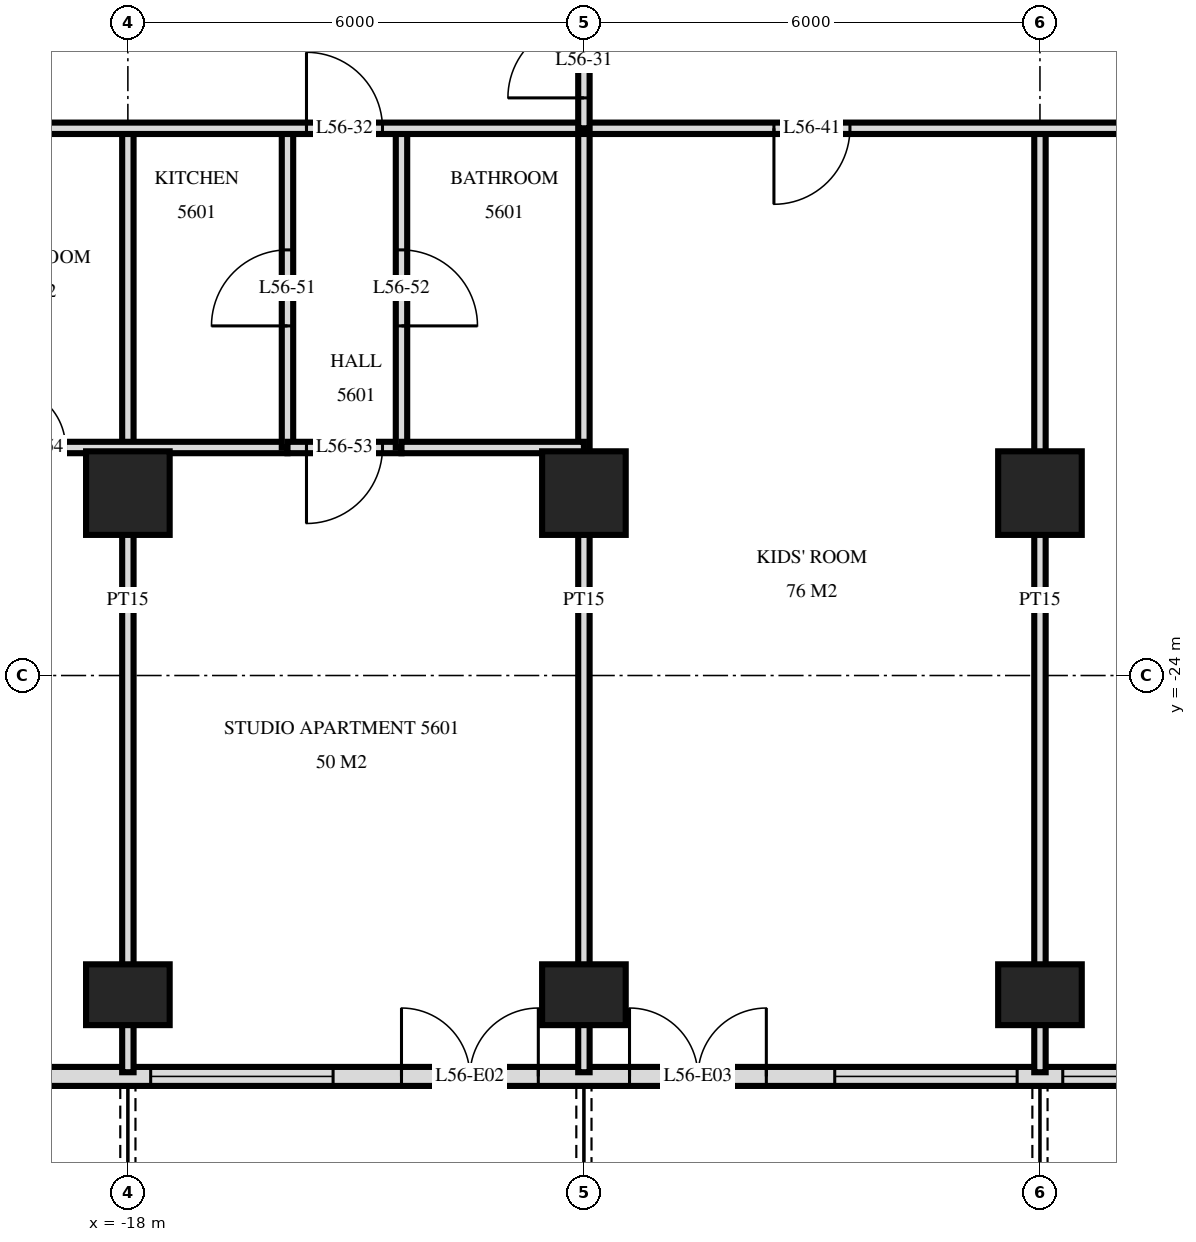
"""IFC4 building model, lengths in metres.
Left out: names, types, materials, properties, quantities, classifications, styles, units other than length and angle.
Written with IfcOpenShell. Run it as: python <this file> out.ifc"""

import sys

from ifc_helpers import new_model, si_unit, direction, frame, frame_2d, origin, origin_2d, place, context, subcontext, project, spatial, rectangle, extrude, element, fill, save


model = new_model("IFC4")
c1 = context("Model", 3, precision=1e-05, world=origin(), true_north=direction((0.0, 1.0)))
c2 = subcontext(c1, "Body", "Model", "MODEL_VIEW")
j1 = project(units=[si_unit("LENGTHUNIT", "METRE"), si_unit("PLANEANGLEUNIT", "RADIAN")], contexts=[c1])
p1 = place(None, origin())
s1 = spatial("IfcSite", under=j1, at=p1, CompositionType="ELEMENT")
p2 = place(p1, origin())
s2 = spatial("IfcBuilding", under=s1, at=p2, CompositionType="ELEMENT")
p3 = place(p2, frame((0.0, 0.0, 215.1)))
s3 = spatial("IfcBuildingStorey", under=s2, at=p3, CompositionType="ELEMENT", Elevation=215.1)
p4 = place(p3, frame((-18.0, -28.2, 0.0), z_axis=(0.0, 0.0, 1.0), x_axis=(1.0, 0.0, 0.0)))
e1 = element("IfcColumn", 1, at=p4, inside=s3, PredefinedType="COLUMN", context=c2, shape_type="SweptSolid", body=[
    extrude(rectangle(XDim=1.1, YDim=0.8, at=origin_2d()), origin(), (0.0, 0.0, 1.0), 3.5),
])
p5 = place(p3, frame((-18.0, -21.6, 0.0), z_axis=(0.0, 0.0, 1.0), x_axis=(1.0, 0.0, 0.0)))
e2 = element("IfcColumn", 2, at=p5, inside=s3, PredefinedType="COLUMN", context=c2, shape_type="SweptSolid", body=[
    extrude(rectangle(XDim=1.1, YDim=1.1, at=origin_2d()), origin(), (0.0, 0.0, 1.0), 3.5),
])
p6 = place(p3, frame((-12.0, -28.2, 0.0), z_axis=(0.0, 0.0, 1.0), x_axis=(1.0, 0.0, 0.0)))
e3 = element("IfcColumn", 3, at=p6, inside=s3, PredefinedType="COLUMN", context=c2, shape_type="SweptSolid", body=[
    extrude(rectangle(XDim=1.1, YDim=0.8, at=origin_2d()), origin(), (0.0, 0.0, 1.0), 3.5),
])
p7 = place(p3, frame((-12.0, -21.6, 0.0), z_axis=(0.0, 0.0, 1.0), x_axis=(1.0, 0.0, 0.0)))
e4 = element("IfcColumn", 4, at=p7, inside=s3, PredefinedType="COLUMN", context=c2, shape_type="SweptSolid", body=[
    extrude(rectangle(XDim=1.1, YDim=1.1, at=origin_2d()), origin(), (0.0, 0.0, 1.0), 3.5),
])
p8 = place(p3, frame((-6.0, -28.2, 0.0), z_axis=(0.0, 0.0, 1.0), x_axis=(1.0, 0.0, 0.0)))
e5 = element("IfcColumn", 5, at=p8, inside=s3, PredefinedType="COLUMN", context=c2, shape_type="SweptSolid", body=[
    extrude(rectangle(XDim=1.1, YDim=0.8, at=origin_2d()), origin(), (0.0, 0.0, 1.0), 3.5),
])
p9 = place(p3, frame((-6.0, -21.6, 0.0), z_axis=(0.0, 0.0, 1.0), x_axis=(1.0, 0.0, 0.0)))
e6 = element("IfcColumn", 6, at=p9, inside=s3, PredefinedType="COLUMN", context=c2, shape_type="SweptSolid", body=[
    extrude(rectangle(XDim=1.1, YDim=1.1, at=origin_2d()), origin(), (0.0, 0.0, 1.0), 3.5),
])
p10 = place(p3, frame((-22.475, -29.275, 0.0), z_axis=(0.0, 0.0, 1.0), x_axis=(1.0, 0.0, 0.0)))
e7 = element("IfcWall", 7, at=p10, inside=s3, PredefinedType="SOLIDWALL", context=c2, shape_type="SweptSolid", body=[
    extrude(rectangle(XDim=44.951, YDim=0.25, at=frame_2d((22.475, 0.0))), origin(), (0.0, 0.0, 1.0), 3.22),
])
p11 = place(p10, frame((0.575, 0.0, 0.0)))
e8 = element("IfcOpeningElement", 8, at=p11, cuts=e7, PredefinedType="OPENING", context=c2, shape_type="SweptSolid", body=[
    extrude(rectangle(XDim=1.8, YDim=2.4, at=frame_2d((0.9, 1.2))), frame((0.0, 0.135, 0.0), z_axis=(0.0, -1.0, 0.0), x_axis=(1.0, 0.0, 0.0)), (0.0, 0.0, 1.0), 0.27),
])
p12 = place(p10, frame((4.775, 0.0, 0.9)))
e9 = element("IfcOpeningElement", 9, at=p12, cuts=e7, PredefinedType="OPENING", context=c2, shape_type="SweptSolid", body=[
    extrude(rectangle(XDim=2.4, YDim=1.5, at=frame_2d((1.2, 0.75))), frame((0.0, 0.135, 0.0), z_axis=(0.0, -1.0, 0.0), x_axis=(1.0, 0.0, 0.0)), (0.0, 0.0, 1.0), 0.27),
])
p13 = place(p10, frame((8.075, 0.0, 0.0)))
e10 = element("IfcOpeningElement", 10, at=p13, cuts=e7, PredefinedType="OPENING", context=c2, shape_type="SweptSolid", body=[
    extrude(rectangle(XDim=1.8, YDim=2.4, at=frame_2d((0.9, 1.2))), frame((0.0, 0.135, 0.0), z_axis=(0.0, -1.0, 0.0), x_axis=(1.0, 0.0, 0.0)), (0.0, 0.0, 1.0), 0.27),
])
p14 = place(p10, frame((11.075, 0.0, 0.0)))
e11 = element("IfcOpeningElement", 11, at=p14, cuts=e7, PredefinedType="OPENING", context=c2, shape_type="SweptSolid", body=[
    extrude(rectangle(XDim=1.8, YDim=2.4, at=frame_2d((0.9, 1.2))), frame((0.0, 0.135, 0.0), z_axis=(0.0, -1.0, 0.0), x_axis=(1.0, 0.0, 0.0)), (0.0, 0.0, 1.0), 0.27),
])
p15 = place(p10, frame((13.775, 0.0, 0.9)))
e12 = element("IfcOpeningElement", 12, at=p15, cuts=e7, PredefinedType="OPENING", context=c2, shape_type="SweptSolid", body=[
    extrude(rectangle(XDim=2.4, YDim=1.5, at=frame_2d((1.2, 0.75))), frame((0.0, 0.135, 0.0), z_axis=(0.0, -1.0, 0.0), x_axis=(1.0, 0.0, 0.0)), (0.0, 0.0, 1.0), 0.27),
])
p16 = place(p10, frame((16.775, 0.0, 0.9)))
e13 = element("IfcOpeningElement", 13, at=p16, cuts=e7, PredefinedType="OPENING", context=c2, shape_type="SweptSolid", body=[
    extrude(rectangle(XDim=2.4, YDim=1.5, at=frame_2d((1.2, 0.75))), frame((0.0, 0.135, 0.0), z_axis=(0.0, -1.0, 0.0), x_axis=(1.0, 0.0, 0.0)), (0.0, 0.0, 1.0), 0.27),
])
p17 = place(p10, frame((20.075, 0.0, 0.0)))
e14 = element("IfcOpeningElement", 14, at=p17, cuts=e7, PredefinedType="OPENING", context=c2, shape_type="SweptSolid", body=[
    extrude(rectangle(XDim=1.8, YDim=2.4, at=frame_2d((0.9, 1.2))), frame((0.0, 0.135, 0.0), z_axis=(0.0, -1.0, 0.0), x_axis=(1.0, 0.0, 0.0)), (0.0, 0.0, 1.0), 0.27),
])
p18 = place(p10, frame((23.075, 0.0, 0.0)))
e15 = element("IfcOpeningElement", 15, at=p18, cuts=e7, PredefinedType="OPENING", context=c2, shape_type="SweptSolid", body=[
    extrude(rectangle(XDim=1.8, YDim=2.4, at=frame_2d((0.9, 1.2))), frame((0.0, 0.135, 0.0), z_axis=(0.0, -1.0, 0.0), x_axis=(1.0, 0.0, 0.0)), (0.0, 0.0, 1.0), 0.27),
])
p19 = place(p10, frame((25.775, 0.0, 0.9)))
e16 = element("IfcOpeningElement", 16, at=p19, cuts=e7, PredefinedType="OPENING", context=c2, shape_type="SweptSolid", body=[
    extrude(rectangle(XDim=2.4, YDim=1.5, at=frame_2d((1.2, 0.75))), frame((0.0, 0.135, 0.0), z_axis=(0.0, -1.0, 0.0), x_axis=(1.0, 0.0, 0.0)), (0.0, 0.0, 1.0), 0.27),
])
p20 = place(p10, frame((29.075, 0.0, 0.0)))
e17 = element("IfcOpeningElement", 17, at=p20, cuts=e7, PredefinedType="OPENING", context=c2, shape_type="SweptSolid", body=[
    extrude(rectangle(XDim=1.8, YDim=2.4, at=frame_2d((0.9, 1.2))), frame((0.0, 0.135, 0.0), z_axis=(0.0, -1.0, 0.0), x_axis=(1.0, 0.0, 0.0)), (0.0, 0.0, 1.0), 0.27),
])
p21 = place(p10, frame((31.775, 0.0, 0.9)))
e18 = element("IfcOpeningElement", 18, at=p21, cuts=e7, PredefinedType="OPENING", context=c2, shape_type="SweptSolid", body=[
    extrude(rectangle(XDim=2.4, YDim=1.5, at=frame_2d((1.2, 0.75))), frame((0.0, 0.135, 0.0), z_axis=(0.0, -1.0, 0.0), x_axis=(1.0, 0.0, 0.0)), (0.0, 0.0, 1.0), 0.27),
])
p22 = place(p10, frame((35.075, 0.0, 0.0)))
e19 = element("IfcOpeningElement", 19, at=p22, cuts=e7, PredefinedType="OPENING", context=c2, shape_type="SweptSolid", body=[
    extrude(rectangle(XDim=1.8, YDim=2.4, at=frame_2d((0.9, 1.2))), frame((0.0, 0.135, 0.0), z_axis=(0.0, -1.0, 0.0), x_axis=(1.0, 0.0, 0.0)), (0.0, 0.0, 1.0), 0.27),
])
p23 = place(p10, frame((41.075, 0.0, 0.0)))
e20 = element("IfcOpeningElement", 20, at=p23, cuts=e7, PredefinedType="OPENING", context=c2, shape_type="SweptSolid", body=[
    extrude(rectangle(XDim=1.8, YDim=2.4, at=frame_2d((0.9, 1.2))), frame((0.0, 0.135, 0.0), z_axis=(0.0, -1.0, 0.0), x_axis=(1.0, 0.0, 0.0)), (0.0, 0.0, 1.0), 0.27),
])
p24 = place(p3, frame((-6.0, -29.22, 0.0), z_axis=(0.0, 0.0, 1.0), x_axis=(0.0, 1.0, 0.0)))
e21 = element("IfcWall", 21, at=p24, inside=s3, PredefinedType="PARTITIONING", context=c2, shape_type="SweptSolid", body=[
    extrude(rectangle(XDim=12.42, YDim=0.15, at=frame_2d((6.21, 0.0))), origin(), (0.0, 0.0, 1.0), 3.22),
])
p25 = place(p3, frame((-12.0, -16.8, 0.0), z_axis=(0.0, 0.0, 1.0), x_axis=(0.0, 1.0, 0.0)))
e22 = element("IfcWall", 22, at=p25, inside=s3, PredefinedType="PARTITIONING", context=c2, shape_type="SweptSolid", body=[
    extrude(rectangle(XDim=1.75, YDim=0.15, at=frame_2d((0.875, 0.0))), origin(), (0.0, 0.0, 1.0), 3.22),
])
p26 = place(p25, frame((0.4, 0.0, 0.0)))
e23 = element("IfcOpeningElement", 23, at=p26, cuts=e22, PredefinedType="OPENING", context=c2, shape_type="SweptSolid", body=[
    extrude(rectangle(XDim=1.0, YDim=2.1, at=frame_2d((0.5, 1.05))), frame((0.0, 0.085, 0.0), z_axis=(0.0, -1.0, 0.0), x_axis=(1.0, 0.0, 0.0)), (0.0, 0.0, 1.0), 0.17),
])
p27 = place(p3, frame((-12.0, -29.22, 0.0), z_axis=(0.0, 0.0, 1.0), x_axis=(0.0, 1.0, 0.0)))
e24 = element("IfcWall", 24, at=p27, inside=s3, PredefinedType="PARTITIONING", context=c2, shape_type="SweptSolid", body=[
    extrude(rectangle(XDim=12.42, YDim=0.15, at=frame_2d((6.21, 0.0))), origin(), (0.0, 0.0, 1.0), 3.22),
])
p28 = place(p3, frame((-14.4, -21.0, 0.0), z_axis=(0.0, 0.0, 1.0), x_axis=(0.0, 1.0, 0.0)))
e25 = element("IfcWall", 25, at=p28, inside=s3, PredefinedType="PARTITIONING", context=c2, shape_type="SweptSolid", body=[
    extrude(rectangle(XDim=4.2, YDim=0.15, at=frame_2d((2.1, 0.0))), origin(), (0.0, 0.0, 1.0), 3.22),
])
p29 = place(p28, frame((1.6, 0.0, 0.0)))
e26 = element("IfcOpeningElement", 26, at=p29, cuts=e25, PredefinedType="OPENING", context=c2, shape_type="SweptSolid", body=[
    extrude(rectangle(XDim=1.0, YDim=2.1, at=frame_2d((0.5, 1.05))), frame((0.0, 0.085, 0.0), z_axis=(0.0, -1.0, 0.0), x_axis=(1.0, 0.0, 0.0)), (0.0, 0.0, 1.0), 0.17),
])
p30 = place(p3, frame((-15.9, -21.0, 0.0), z_axis=(0.0, 0.0, 1.0), x_axis=(0.0, 1.0, 0.0)))
e27 = element("IfcWall", 27, at=p30, inside=s3, PredefinedType="PARTITIONING", context=c2, shape_type="SweptSolid", body=[
    extrude(rectangle(XDim=4.2, YDim=0.15, at=frame_2d((2.1, 0.0))), origin(), (0.0, 0.0, 1.0), 3.22),
])
p31 = place(p30, frame((1.6, 0.0, 0.0)))
e28 = element("IfcOpeningElement", 28, at=p31, cuts=e27, PredefinedType="OPENING", context=c2, shape_type="SweptSolid", body=[
    extrude(rectangle(XDim=1.0, YDim=2.1, at=frame_2d((0.5, 1.05))), frame((0.0, 0.085, 0.0), z_axis=(0.0, -1.0, 0.0), x_axis=(1.0, 0.0, 0.0)), (0.0, 0.0, 1.0), 0.17),
])
p32 = place(p3, frame((-18.0, -29.22, 0.0), z_axis=(0.0, 0.0, 1.0), x_axis=(0.0, 1.0, 0.0)))
e29 = element("IfcWall", 29, at=p32, inside=s3, PredefinedType="PARTITIONING", context=c2, shape_type="SweptSolid", body=[
    extrude(rectangle(XDim=12.42, YDim=0.15, at=frame_2d((6.21, 0.0))), origin(), (0.0, 0.0, 1.0), 3.22),
])
p33 = place(p3, frame((-15.9, -21.0, 0.0), z_axis=(0.0, 0.0, 1.0), x_axis=(1.0, 0.0, 0.0)))
e30 = element("IfcWall", 30, at=p33, inside=s3, PredefinedType="PARTITIONING", context=c2, shape_type="SweptSolid", body=[
    extrude(rectangle(XDim=1.5, YDim=0.15, at=frame_2d((0.75, 0.0))), origin(), (0.0, 0.0, 1.0), 3.22),
])
p34 = place(p33, frame((0.25, 0.0, 0.0)))
e31 = element("IfcOpeningElement", 31, at=p34, cuts=e30, PredefinedType="OPENING", context=c2, shape_type="SweptSolid", body=[
    extrude(rectangle(XDim=1.0, YDim=2.1, at=frame_2d((0.5, 1.05))), frame((0.0, 0.085, 0.0), z_axis=(0.0, -1.0, 0.0), x_axis=(1.0, 0.0, 0.0)), (0.0, 0.0, 1.0), 0.17),
])
p35 = place(p3, frame((-22.2, -21.0, 0.0), z_axis=(0.0, 0.0, 1.0), x_axis=(1.0, 0.0, 0.0)))
e32 = element("IfcWall", 32, at=p35, inside=s3, PredefinedType="PARTITIONING", context=c2, shape_type="SweptSolid", body=[
    extrude(rectangle(XDim=6.3, YDim=0.15, at=frame_2d((3.15, 0.0))), origin(), (0.0, 0.0, 1.0), 3.22),
])
p36 = place(p35, frame((2.58, 0.0, 0.0)))
e33 = element("IfcOpeningElement", 33, at=p36, cuts=e32, PredefinedType="OPENING", context=c2, shape_type="SweptSolid", body=[
    extrude(rectangle(XDim=0.8, YDim=2.1, at=frame_2d((0.4, 1.05))), frame((0.0, 0.085, 0.0), z_axis=(0.0, -1.0, 0.0), x_axis=(1.0, 0.0, 0.0)), (0.0, 0.0, 1.0), 0.17),
])
p37 = place(p3, frame((-14.4, -21.0, 0.0), z_axis=(0.0, 0.0, 1.0), x_axis=(1.0, 0.0, 0.0)))
e34 = element("IfcWall", 34, at=p37, inside=s3, PredefinedType="PARTITIONING", context=c2, shape_type="SweptSolid", body=[
    extrude(rectangle(XDim=2.4, YDim=0.15, at=frame_2d((1.2, 0.0))), origin(), (0.0, 0.0, 1.0), 3.22),
])
p38 = place(p3, frame((-26.82, -16.8, 0.0), z_axis=(0.0, 0.0, 1.0), x_axis=(1.0, 0.0, 0.0)))
e35 = element("IfcWall", 35, at=p38, inside=s3, PredefinedType="PARTITIONING", context=c2, shape_type="SweptSolid", body=[
    extrude(rectangle(XDim=53.64, YDim=0.15, at=frame_2d((26.82, 0.0))), origin(), (0.0, 0.0, 1.0), 3.22),
])
p39 = place(p38, frame((11.17, 0.0, 0.0)))
e36 = element("IfcOpeningElement", 36, at=p39, cuts=e35, PredefinedType="OPENING", context=c2, shape_type="SweptSolid", body=[
    extrude(rectangle(XDim=1.0, YDim=2.1, at=frame_2d((0.5, 1.05))), frame((0.0, 0.085, 0.0), z_axis=(0.0, -1.0, 0.0), x_axis=(1.0, 0.0, 0.0)), (0.0, 0.0, 1.0), 0.17),
])
p40 = place(p38, frame((3.22, 0.0, 0.0)))
e37 = element("IfcOpeningElement", 37, at=p40, cuts=e35, PredefinedType="OPENING", context=c2, shape_type="SweptSolid", body=[
    extrude(rectangle(XDim=1.0, YDim=2.1, at=frame_2d((0.5, 1.05))), frame((0.0, 0.085, 0.0), z_axis=(0.0, -1.0, 0.0), x_axis=(1.0, 0.0, 0.0)), (0.0, 0.0, 1.0), 0.17),
])
p41 = place(p38, frame((5.02, 0.0, 0.0)))
e38 = element("IfcOpeningElement", 38, at=p41, cuts=e35, PredefinedType="OPENING", context=c2, shape_type="SweptSolid", body=[
    extrude(rectangle(XDim=1.0, YDim=2.1, at=frame_2d((0.5, 1.05))), frame((0.0, 0.085, 0.0), z_axis=(0.0, -1.0, 0.0), x_axis=(1.0, 0.0, 0.0)), (0.0, 0.0, 1.0), 0.17),
])
p42 = place(p38, frame((47.72, 0.0, 0.0)))
e39 = element("IfcOpeningElement", 39, at=p42, cuts=e35, PredefinedType="OPENING", context=c2, shape_type="SweptSolid", body=[
    extrude(rectangle(XDim=1.0, YDim=2.1, at=frame_2d((0.5, 1.05))), frame((0.0, 0.085, 0.0), z_axis=(0.0, -1.0, 0.0), x_axis=(1.0, 0.0, 0.0)), (0.0, 0.0, 1.0), 0.17),
])
p43 = place(p38, frame((51.04, 0.0, 0.0)))
e40 = element("IfcOpeningElement", 40, at=p43, cuts=e35, PredefinedType="OPENING", context=c2, shape_type="SweptSolid", body=[
    extrude(rectangle(XDim=1.0, YDim=2.1, at=frame_2d((0.5, 1.05))), frame((0.0, 0.085, 0.0), z_axis=(0.0, -1.0, 0.0), x_axis=(1.0, 0.0, 0.0)), (0.0, 0.0, 1.0), 0.17),
])
p44 = place(p38, frame((17.32, 0.0, 0.0)))
e41 = element("IfcOpeningElement", 41, at=p44, cuts=e35, PredefinedType="OPENING", context=c2, shape_type="SweptSolid", body=[
    extrude(rectangle(XDim=1.0, YDim=2.1, at=frame_2d((0.5, 1.05))), frame((0.0, 0.085, 0.0), z_axis=(0.0, -1.0, 0.0), x_axis=(1.0, 0.0, 0.0)), (0.0, 0.0, 1.0), 0.17),
])
p45 = place(p38, frame((26.32, 0.0, 0.0)))
e42 = element("IfcOpeningElement", 42, at=p45, cuts=e35, PredefinedType="OPENING", context=c2, shape_type="SweptSolid", body=[
    extrude(rectangle(XDim=1.0, YDim=2.1, at=frame_2d((0.5, 1.05))), frame((0.0, 0.085, 0.0), z_axis=(0.0, -1.0, 0.0), x_axis=(1.0, 0.0, 0.0)), (0.0, 0.0, 1.0), 0.17),
])
p46 = place(p38, frame((35.32, 0.0, 0.0)))
e43 = element("IfcOpeningElement", 43, at=p46, cuts=e35, PredefinedType="OPENING", context=c2, shape_type="SweptSolid", body=[
    extrude(rectangle(XDim=1.0, YDim=2.1, at=frame_2d((0.5, 1.05))), frame((0.0, 0.085, 0.0), z_axis=(0.0, -1.0, 0.0), x_axis=(1.0, 0.0, 0.0)), (0.0, 0.0, 1.0), 0.17),
])
p47 = place(p12, origin())
e44 = element("IfcWindow", 44, at=p47, inside=s3, PartitioningType="SINGLE_PANEL", PredefinedType="WINDOW", context=c2, shape_type="SweptSolid", body=[
    extrude(rectangle(XDim=2.4, YDim=1.5, at=frame_2d((1.2, 0.75))), frame((0.0, 0.03, 0.0), z_axis=(0.0, -1.0, 0.0), x_axis=(1.0, 0.0, 0.0)), (0.0, 0.0, 1.0), 0.06),
])
fill(e9, e44)
p48 = place(p13, origin())
e45 = element("IfcDoor", 45, at=p48, inside=s3, OperationType="DOUBLE_DOOR_SINGLE_SWING", PredefinedType="DOOR", context=c2, shape_type="SweptSolid", body=[
    extrude(rectangle(XDim=1.8, YDim=2.4, at=frame_2d((0.9, 1.2))), frame((0.0, 0.025, 0.0), z_axis=(0.0, -1.0, 0.0), x_axis=(1.0, 0.0, 0.0)), (0.0, 0.0, 1.0), 0.05),
])
fill(e10, e45)
p49 = place(p14, origin())
e46 = element("IfcDoor", 46, at=p49, inside=s3, OperationType="DOUBLE_DOOR_SINGLE_SWING", PredefinedType="DOOR", context=c2, shape_type="SweptSolid", body=[
    extrude(rectangle(XDim=1.8, YDim=2.4, at=frame_2d((0.9, 1.2))), frame((0.0, 0.025, 0.0), z_axis=(0.0, -1.0, 0.0), x_axis=(1.0, 0.0, 0.0)), (0.0, 0.0, 1.0), 0.05),
])
fill(e11, e46)
p50 = place(p15, origin())
e47 = element("IfcWindow", 47, at=p50, inside=s3, PartitioningType="SINGLE_PANEL", PredefinedType="WINDOW", context=c2, shape_type="SweptSolid", body=[
    extrude(rectangle(XDim=2.4, YDim=1.5, at=frame_2d((1.2, 0.75))), frame((0.0, 0.03, 0.0), z_axis=(0.0, -1.0, 0.0), x_axis=(1.0, 0.0, 0.0)), (0.0, 0.0, 1.0), 0.06),
])
fill(e12, e47)
p51 = place(p16, origin())
e48 = element("IfcWindow", 48, at=p51, inside=s3, PartitioningType="SINGLE_PANEL", PredefinedType="WINDOW", context=c2, shape_type="SweptSolid", body=[
    extrude(rectangle(XDim=2.4, YDim=1.5, at=frame_2d((1.2, 0.75))), frame((0.0, 0.03, 0.0), z_axis=(0.0, -1.0, 0.0), x_axis=(1.0, 0.0, 0.0)), (0.0, 0.0, 1.0), 0.06),
])
fill(e13, e48)
p52 = place(p26, origin())
e49 = element("IfcDoor", 49, at=p52, inside=s3, OperationType="SINGLE_SWING_RIGHT", PredefinedType="DOOR", context=c2, shape_type="SweptSolid", body=[
    extrude(rectangle(XDim=1.0, YDim=2.1, at=frame_2d((0.5, 1.05))), frame((0.0, 0.025, 0.0), z_axis=(0.0, -1.0, 0.0), x_axis=(1.0, 0.0, 0.0)), (0.0, 0.0, 1.0), 0.05),
])
fill(e23, e49)
p53 = place(p39, origin())
e50 = element("IfcDoor", 50, at=p53, inside=s3, OperationType="SINGLE_SWING_RIGHT", PredefinedType="DOOR", context=c2, shape_type="SweptSolid", body=[
    extrude(rectangle(XDim=1.0, YDim=2.1, at=frame_2d((0.5, 1.05))), frame((0.0, 0.025, 0.0), z_axis=(0.0, -1.0, 0.0), x_axis=(1.0, 0.0, 0.0)), (0.0, 0.0, 1.0), 0.05),
])
fill(e36, e50)
p54 = place(p44, frame((0.5, 0.0, 0.0), z_axis=(0.0, 0.0, 1.0), x_axis=(-1.0, 0.0, 0.0)))
e51 = element("IfcDoor", 51, at=p54, inside=s3, OperationType="SINGLE_SWING_LEFT", PredefinedType="DOOR", context=c2, shape_type="SweptSolid", body=[
    extrude(rectangle(XDim=1.0, YDim=2.1, at=frame_2d((0.0, 1.05))), frame((0.0, -0.025, 0.0), z_axis=(0.0, 1.0, 0.0), x_axis=(-1.0, 0.0, 0.0)), (0.0, 0.0, 1.0), 0.05),
])
fill(e41, e51)
p55 = place(p31, origin())
e52 = element("IfcDoor", 52, at=p55, inside=s3, OperationType="SINGLE_SWING_RIGHT", PredefinedType="DOOR", context=c2, shape_type="SweptSolid", body=[
    extrude(rectangle(XDim=1.0, YDim=2.1, at=frame_2d((0.5, 1.05))), frame((0.0, 0.025, 0.0), z_axis=(0.0, -1.0, 0.0), x_axis=(1.0, 0.0, 0.0)), (0.0, 0.0, 1.0), 0.05),
])
fill(e28, e52)
p56 = place(p29, frame((0.5, 0.0, 0.0), z_axis=(0.0, 0.0, 1.0), x_axis=(-1.0, 0.0, 0.0)))
e53 = element("IfcDoor", 53, at=p56, inside=s3, OperationType="SINGLE_SWING_LEFT", PredefinedType="DOOR", context=c2, shape_type="SweptSolid", body=[
    extrude(rectangle(XDim=1.0, YDim=2.1, at=frame_2d((0.0, 1.05))), frame((0.0, -0.025, 0.0), z_axis=(0.0, 1.0, 0.0), x_axis=(-1.0, 0.0, 0.0)), (0.0, 0.0, 1.0), 0.05),
])
fill(e26, e53)
p57 = place(p34, frame((0.5, 0.0, 0.0), z_axis=(0.0, 0.0, 1.0), x_axis=(-1.0, 0.0, 0.0)))
e54 = element("IfcDoor", 54, at=p57, inside=s3, OperationType="SINGLE_SWING_LEFT", PredefinedType="DOOR", context=c2, shape_type="SweptSolid", body=[
    extrude(rectangle(XDim=1.0, YDim=2.1, at=frame_2d((0.0, 1.05))), frame((0.0, -0.025, 0.0), z_axis=(0.0, 1.0, 0.0), x_axis=(-1.0, 0.0, 0.0)), (0.0, 0.0, 1.0), 0.05),
])
fill(e31, e54)
p58 = place(p36, origin())
e55 = element("IfcDoor", 55, at=p58, inside=s3, OperationType="SINGLE_SWING_RIGHT", PredefinedType="DOOR", context=c2, shape_type="SweptSolid", body=[
    extrude(rectangle(XDim=0.8, YDim=2.1, at=frame_2d((0.4, 1.05))), frame((0.0, 0.025, 0.0), z_axis=(0.0, -1.0, 0.0), x_axis=(1.0, 0.0, 0.0)), (0.0, 0.0, 1.0), 0.05),
])
fill(e33, e55)
save(model, sys.argv[1])
